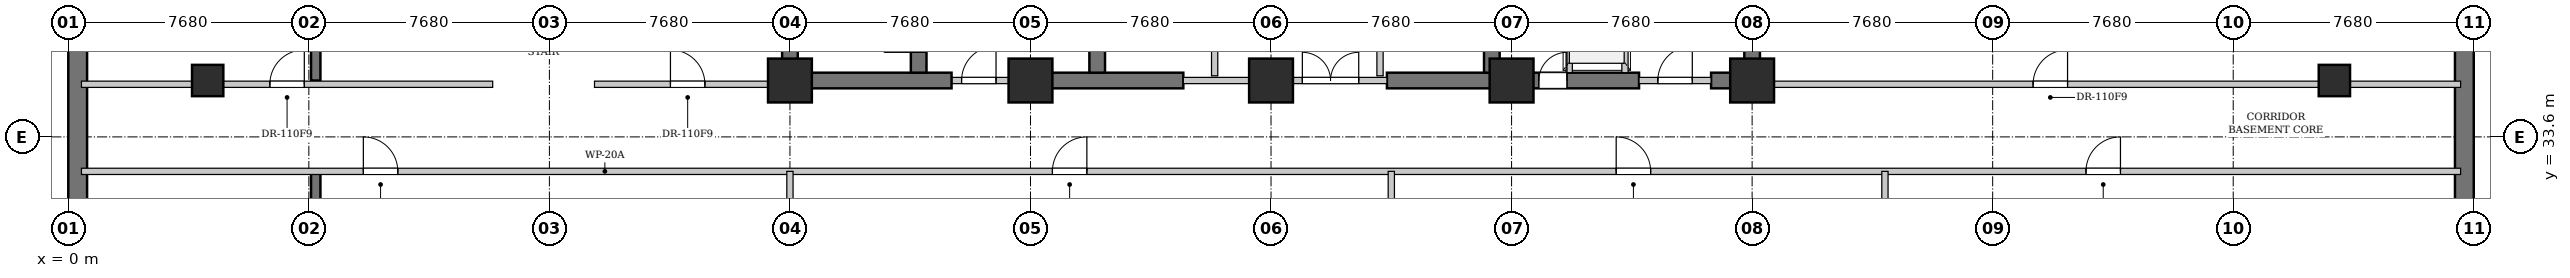
"""IFC4 building model, lengths in metres.
Left out: names, types, materials, properties, quantities, classifications, styles, units other than length and angle.
Written with IfcOpenShell. Run it as: python <this file> out.ifc"""

import sys

from ifc_helpers import new_model, si_unit, direction, frame, frame_2d, origin, origin_2d, place, context, subcontext, project, spatial, rectangle, extrude, element, fill, save


model = new_model("IFC4")
c1 = context("Model", 3, precision=1e-05, world=origin(), true_north=direction((0.0, 1.0)))
c2 = subcontext(c1, "Body", "Model", "MODEL_VIEW")
j1 = project(units=[si_unit("LENGTHUNIT", "METRE"), si_unit("PLANEANGLEUNIT", "RADIAN")], contexts=[c1])
p1 = place(None, origin())
s1 = spatial("IfcSite", under=j1, at=p1, CompositionType="ELEMENT")
p2 = place(p1, origin())
s2 = spatial("IfcBuilding", under=s1, at=p2, CompositionType="ELEMENT")
p3 = place(p2, frame((0.0, 0.0, -10.0)))
s3 = spatial("IfcBuildingStorey", under=s2, at=p3, CompositionType="ELEMENT", Elevation=-10.0)
for number, where, z_axis, x_axis in (
    (1, (0.3, 0.6, 0.0), (0.0, 0.0, 1.0), (0.0, 1.0, 0.0)),
    (2, (76.5, 0.6, 0.0), (0.0, 0.0, 1.0), (0.0, 1.0, 0.0)),
):
    element("IfcWall", number, at=place(p3, frame(where, z_axis=z_axis, x_axis=x_axis)), inside=s3, PredefinedType="USERDEFINED", context=c2, shape_type="SweptSolid", body=[
        extrude(rectangle(XDim=49.2, YDim=0.6, at=frame_2d((24.6, 0.0))), origin(), (0.0, 0.0, 1.0), 4.65),
    ])
p4 = place(p3, frame((22.79, 35.4, 0.0), z_axis=(0.0, 0.0, 1.0), x_axis=(1.0, 0.0, 0.0)))
e3 = element("IfcWall", 3, at=p4, inside=s3, PredefinedType="SHEAR", context=c2, shape_type="SweptSolid", body=[
    extrude(rectangle(XDim=5.41, YDim=0.5, at=frame_2d((2.705, 0.0))), origin(), (0.0, 0.0, 1.0), 4.65),
])
p5 = place(p3, frame((30.72, 35.4, 0.0), z_axis=(0.0, 0.0, 1.0), x_axis=(1.0, 0.0, 0.0)))
e4 = element("IfcWall", 4, at=p5, inside=s3, PredefinedType="SHEAR", context=c2, shape_type="SweptSolid", body=[
    extrude(rectangle(XDim=4.88, YDim=0.5, at=frame_2d((2.44, 0.0))), origin(), (0.0, 0.0, 1.0), 4.65),
])
p6 = place(p3, frame((42.1, 35.4, 0.0), z_axis=(0.0, 0.0, 1.0), x_axis=(1.0, 0.0, 0.0)))
e5 = element("IfcWall", 5, at=p6, inside=s3, PredefinedType="SHEAR", context=c2, shape_type="SweptSolid", body=[
    extrude(rectangle(XDim=8.05, YDim=0.5, at=frame_2d((4.025, 0.0))), origin(), (0.0, 0.0, 1.0), 4.65),
])
p7 = place(p6, frame((4.85, 0.0, 0.0)))
e6 = element("IfcOpeningElement", 6, at=p7, cuts=e5, PredefinedType="OPENING", context=c2, shape_type="SweptSolid", body=[
    extrude(rectangle(XDim=0.9, YDim=2.15, at=frame_2d((0.45, 1.075))), frame((0.0, 0.26, 0.0), z_axis=(0.0, -1.0, 0.0), x_axis=(1.0, 0.0, 0.0)), (0.0, 0.0, 1.0), 0.52),
])
p8 = place(p3, frame((52.45, 35.4, 0.0), z_axis=(0.0, 0.0, 1.0), x_axis=(1.0, 0.0, 0.0)))
e7 = element("IfcWall", 7, at=p8, inside=s3, PredefinedType="SHEAR", context=c2, shape_type="SweptSolid", body=[
    extrude(rectangle(XDim=1.56, YDim=0.5, at=frame_2d((0.78, 0.0))), origin(), (0.0, 0.0, 1.0), 4.65),
])
p9 = place(p3, frame((23.04, 35.65, 0.0), z_axis=(0.0, 0.0, 1.0), x_axis=(0.0, 1.0, 0.0)))
e8 = element("IfcWall", 8, at=p9, inside=s3, PredefinedType="SHEAR", context=c2, shape_type="SweptSolid", body=[
    extrude(rectangle(XDim=10.3, YDim=0.5, at=frame_2d((5.15, 0.0))), origin(), (0.0, 0.0, 1.0), 4.65),
])
p10 = place(p3, frame((27.15, 35.65, 0.0), z_axis=(0.0, 0.0, 1.0), x_axis=(0.0, 1.0, 0.0)))
e9 = element("IfcWall", 9, at=p10, inside=s3, PredefinedType="SHEAR", context=c2, shape_type="SweptSolid", body=[
    extrude(rectangle(XDim=10.3, YDim=0.5, at=frame_2d((5.15, 0.0))), origin(), (0.0, 0.0, 1.0), 4.65),
])
p11 = place(p10, frame((0.65, 0.0, 0.0)))
e10 = element("IfcOpeningElement", 10, at=p11, cuts=e9, PredefinedType="OPENING", context=c2, shape_type="SweptSolid", body=[
    extrude(rectangle(XDim=1.1, YDim=2.15, at=frame_2d((0.55, 1.075))), frame((0.0, 0.26, 0.0), z_axis=(0.0, -1.0, 0.0), x_axis=(1.0, 0.0, 0.0)), (0.0, 0.0, 1.0), 0.52),
])
for number, where, z_axis, x_axis in (
    (11, (32.85, 35.65, 0.0), (0.0, 0.0, 1.0), (0.0, 1.0, 0.0)),
    (12, (45.45, 35.65, 0.0), (0.0, 0.0, 1.0), (0.0, 1.0, 0.0)),
    (13, (53.76, 35.65, 0.0), (0.0, 0.0, 1.0), (0.0, 1.0, 0.0)),
):
    element("IfcWall", number, at=place(p3, frame(where, z_axis=z_axis, x_axis=x_axis)), inside=s3, PredefinedType="SHEAR", context=c2, shape_type="SweptSolid", body=[
        extrude(rectangle(XDim=10.3, YDim=0.5, at=frame_2d((5.15, 0.0))), origin(), (0.0, 0.0, 1.0), 4.65),
    ])
p12 = place(p3, frame((7.9, 0.65, 0.0), z_axis=(0.0, 0.0, 1.0), x_axis=(0.0, 1.0, 0.0)))
e14 = element("IfcWall", 14, at=p12, inside=s3, PredefinedType="SHEAR", context=c2, shape_type="SweptSolid", body=[
    extrude(rectangle(XDim=31.85, YDim=0.3, at=frame_2d((15.925, 0.0))), origin(), (0.0, 0.0, 1.0), 4.65),
])
p13 = place(p3, frame((7.9, 35.4, 0.0), z_axis=(0.0, 0.0, 1.0), x_axis=(0.0, 1.0, 0.0)))
e15 = element("IfcWall", 15, at=p13, inside=s3, PredefinedType="SHEAR", context=c2, shape_type="SweptSolid", body=[
    extrude(rectangle(XDim=14.35, YDim=0.3, at=frame_2d((7.175, 0.0))), origin(), (0.0, 0.0, 1.0), 4.65),
])
for number, where, z_axis, x_axis in (
    (16, (23.04, 35.4, 0.0), (0.0, 0.0, 1.0), (1.0, 0.0, 0.0)),
    (17, (30.72, 35.4, 0.0), (0.0, 0.0, 1.0), (1.0, 0.0, 0.0)),
    (18, (38.4, 35.4, 0.0), (0.0, 0.0, 1.0), (1.0, 0.0, 0.0)),
    (19, (46.08, 35.4, 0.0), (0.0, 0.0, 1.0), (1.0, 0.0, 0.0)),
    (20, (53.76, 35.4, 0.0), (0.0, 0.0, 1.0), (1.0, 0.0, 0.0)),
):
    element("IfcColumn", number, at=place(p3, frame(where, z_axis=z_axis, x_axis=x_axis)), inside=s3, PredefinedType="COLUMN", context=c2, shape_type="SweptSolid", body=[
        extrude(rectangle(XDim=1.4, YDim=1.4, at=origin_2d()), origin(), (0.0, 0.0, 1.0), 5.0),
    ])
for number, where, z_axis, x_axis in (
    (21, (4.45, 35.4, 0.0), (0.0, 0.0, 1.0), (1.0, 0.0, 0.0)),
    (22, (72.35, 35.4, 0.0), (0.0, 0.0, 1.0), (1.0, 0.0, 0.0)),
):
    element("IfcColumn", number, at=place(p3, frame(where, z_axis=z_axis, x_axis=x_axis)), inside=s3, PredefinedType="COLUMN", context=c2, shape_type="SweptSolid", body=[
        extrude(rectangle(XDim=1.0, YDim=1.0, at=origin_2d()), origin(), (0.0, 0.0, 1.0), 5.0),
    ])
p14 = place(p3, frame((28.22, 35.4, 0.0), z_axis=(0.0, 0.0, 1.0), x_axis=(1.0, 0.0, 0.0)))
e23 = element("IfcWall", 23, at=p14, inside=s3, PredefinedType="PARTITIONING", context=c2, shape_type="SweptSolid", body=[
    extrude(rectangle(XDim=2.5, YDim=0.2, at=frame_2d((1.25, 0.0))), origin(), (0.0, 0.0, 1.0), 3.845),
])
p15 = place(p14, frame((0.3, 0.0, 0.0)))
e24 = element("IfcOpeningElement", 24, at=p15, cuts=e23, PredefinedType="OPENING", context=c2, shape_type="SweptSolid", body=[
    extrude(rectangle(XDim=1.1, YDim=2.15, at=frame_2d((0.55, 1.075))), frame((0.0, 0.11, 0.0), z_axis=(0.0, -1.0, 0.0), x_axis=(1.0, 0.0, 0.0)), (0.0, 0.0, 1.0), 0.22),
])
p16 = place(p3, frame((35.6, 35.4, 0.0), z_axis=(0.0, 0.0, 1.0), x_axis=(1.0, 0.0, 0.0)))
e25 = element("IfcWall", 25, at=p16, inside=s3, PredefinedType="PARTITIONING", context=c2, shape_type="SweptSolid", body=[
    extrude(rectangle(XDim=6.5, YDim=0.2, at=frame_2d((3.25, 0.0))), origin(), (0.0, 0.0, 1.0), 3.845),
])
p17 = place(p16, frame((3.8, 0.0, 0.0)))
e26 = element("IfcOpeningElement", 26, at=p17, cuts=e25, PredefinedType="OPENING", context=c2, shape_type="SweptSolid", body=[
    extrude(rectangle(XDim=1.8, YDim=2.3, at=frame_2d((0.9, 1.15))), frame((0.0, 0.11, 0.0), z_axis=(0.0, -1.0, 0.0), x_axis=(1.0, 0.0, 0.0)), (0.0, 0.0, 1.0), 0.22),
])
p18 = place(p3, frame((36.6, 35.55, 0.0), z_axis=(0.0, 0.0, 1.0), x_axis=(0.0, 1.0, 0.0)))
e27 = element("IfcWall", 27, at=p18, inside=s3, PredefinedType="PARTITIONING", context=c2, shape_type="SweptSolid", body=[
    extrude(rectangle(XDim=10.37, YDim=0.2, at=frame_2d((5.185, 0.0))), origin(), (0.0, 0.0, 1.0), 4.65),
])
p19 = place(p3, frame((41.88, 35.55, 0.0), z_axis=(0.0, 0.0, 1.0), x_axis=(0.0, 1.0, 0.0)))
e28 = element("IfcWall", 28, at=p19, inside=s3, PredefinedType="PARTITIONING", context=c2, shape_type="SweptSolid", body=[
    extrude(rectangle(XDim=7.1, YDim=0.2, at=frame_2d((3.55, 0.0))), origin(), (0.0, 0.0, 1.0), 4.65),
])
p20 = place(p19, frame((2.8, 0.0, 0.0)))
e29 = element("IfcOpeningElement", 29, at=p20, cuts=e28, PredefinedType="OPENING", context=c2, shape_type="SweptSolid", body=[
    extrude(rectangle(XDim=0.9, YDim=2.15, at=frame_2d((0.45, 1.075))), frame((0.0, 0.11, 0.0), z_axis=(0.0, -1.0, 0.0), x_axis=(1.0, 0.0, 0.0)), (0.0, 0.0, 1.0), 0.22),
])
p21 = place(p3, frame((50.15, 35.4, 0.0), z_axis=(0.0, 0.0, 1.0), x_axis=(1.0, 0.0, 0.0)))
e30 = element("IfcWall", 30, at=p21, inside=s3, PredefinedType="PARTITIONING", context=c2, shape_type="SweptSolid", body=[
    extrude(rectangle(XDim=2.3, YDim=0.2, at=frame_2d((1.15, 0.0))), origin(), (0.0, 0.0, 1.0), 3.845),
])
p22 = place(p21, frame((0.6, 0.0, 0.0)))
e31 = element("IfcOpeningElement", 31, at=p22, cuts=e30, PredefinedType="OPENING", context=c2, shape_type="SweptSolid", body=[
    extrude(rectangle(XDim=1.1, YDim=2.15, at=frame_2d((0.55, 1.075))), frame((0.0, 0.11, 0.0), z_axis=(0.0, -1.0, 0.0), x_axis=(1.0, 0.0, 0.0)), (0.0, 0.0, 1.0), 0.22),
])
p23 = place(p3, frame((49.7, 35.65, 0.0), z_axis=(0.0, 0.0, 1.0), x_axis=(0.0, 1.0, 0.0)))
e32 = element("IfcWall", 32, at=p23, inside=s3, PredefinedType="PARTITIONING", context=c2, shape_type="SweptSolid", body=[
    extrude(rectangle(XDim=3.15, YDim=0.2, at=frame_2d((1.575, 0.0))), origin(), (0.0, 0.0, 1.0), 4.65),
])
p24 = place(p23, frame((0.85, 0.0, 0.0)))
e33 = element("IfcOpeningElement", 33, at=p24, cuts=e32, PredefinedType="OPENING", context=c2, shape_type="SweptSolid", body=[
    extrude(rectangle(XDim=1.2, YDim=2.2, at=frame_2d((0.6, 1.1))), frame((0.0, 0.11, 0.0), z_axis=(0.0, -1.0, 0.0), x_axis=(1.0, 0.0, 0.0)), (0.0, 0.0, 1.0), 0.22),
])
p25 = place(p3, frame((47.92, 35.65, 0.0), z_axis=(0.0, 0.0, 1.0), x_axis=(0.0, 1.0, 0.0)))
e34 = element("IfcWall", 34, at=p25, inside=s3, PredefinedType="PARTITIONING", context=c2, shape_type="SweptSolid", body=[
    extrude(rectangle(XDim=3.15, YDim=0.2, at=frame_2d((1.575, 0.0))), origin(), (0.0, 0.0, 1.0), 4.65),
])
p26 = place(p3, frame((0.42, 35.28, 0.0), z_axis=(0.0, 0.0, 1.0), x_axis=(1.0, 0.0, 0.0)))
e35 = element("IfcWall", 35, at=p26, inside=s3, PredefinedType="PARTITIONING", context=c2, shape_type="SweptSolid", body=[
    extrude(rectangle(XDim=13.13, YDim=0.2, at=frame_2d((6.565, 0.0))), origin(), (0.0, 0.0, 1.0), 4.65),
])
p27 = place(p26, frame((6.015, 0.0, 0.0)))
e36 = element("IfcOpeningElement", 36, at=p27, cuts=e35, PredefinedType="OPENING", context=c2, shape_type="SweptSolid", body=[
    extrude(rectangle(XDim=1.1, YDim=2.15, at=frame_2d((0.55, 1.075))), frame((0.0, 0.11, 0.0), z_axis=(0.0, -1.0, 0.0), x_axis=(1.0, 0.0, 0.0)), (0.0, 0.0, 1.0), 0.22),
])
p28 = place(p3, frame((16.8, 35.28, 0.0), z_axis=(0.0, 0.0, 1.0), x_axis=(1.0, 0.0, 0.0)))
e37 = element("IfcWall", 37, at=p28, inside=s3, PredefinedType="PARTITIONING", context=c2, shape_type="SweptSolid", body=[
    extrude(rectangle(XDim=5.95, YDim=0.2, at=frame_2d((2.975, 0.0))), origin(), (0.0, 0.0, 1.0), 3.845),
])
p29 = place(p28, frame((2.425, 0.0, 0.0)))
e38 = element("IfcOpeningElement", 38, at=p29, cuts=e37, PredefinedType="OPENING", context=c2, shape_type="SweptSolid", body=[
    extrude(rectangle(XDim=1.1, YDim=2.15, at=frame_2d((0.55, 1.075))), frame((0.0, 0.11, 0.0), z_axis=(0.0, -1.0, 0.0), x_axis=(1.0, 0.0, 0.0)), (0.0, 0.0, 1.0), 0.22),
])
p30 = place(p3, frame((54.05, 35.28, 0.0), z_axis=(0.0, 0.0, 1.0), x_axis=(1.0, 0.0, 0.0)))
e39 = element("IfcWall", 39, at=p30, inside=s3, PredefinedType="PARTITIONING", context=c2, shape_type="SweptSolid", body=[
    extrude(rectangle(XDim=22.33, YDim=0.2, at=frame_2d((11.165, 0.0))), origin(), (0.0, 0.0, 1.0), 3.845),
])
p31 = place(p30, frame((8.681, 0.0, 0.0)))
e40 = element("IfcOpeningElement", 40, at=p31, cuts=e39, PredefinedType="OPENING", context=c2, shape_type="SweptSolid", body=[
    extrude(rectangle(XDim=1.1, YDim=2.15, at=frame_2d((0.55, 1.075))), frame((0.0, 0.11, 0.0), z_axis=(0.0, -1.0, 0.0), x_axis=(1.0, 0.0, 0.0)), (0.0, 0.0, 1.0), 0.22),
])
p32 = place(p3, frame((0.42, 32.5, 0.0), z_axis=(0.0, 0.0, 1.0), x_axis=(1.0, 0.0, 0.0)))
e41 = element("IfcWall", 41, at=p32, inside=s3, PredefinedType="PARTITIONING", context=c2, shape_type="SweptSolid", body=[
    extrude(rectangle(XDim=75.96, YDim=0.2, at=frame_2d((37.98, 0.0))), origin(), (0.0, 0.0, 1.0), 3.845),
])
p33 = place(p32, frame((9.0, 0.0, 0.0)))
e42 = element("IfcOpeningElement", 42, at=p33, cuts=e41, PredefinedType="OPENING", context=c2, shape_type="SweptSolid", body=[
    extrude(rectangle(XDim=1.1, YDim=2.15, at=frame_2d((0.55, 1.075))), frame((0.0, 0.11, 0.0), z_axis=(0.0, -1.0, 0.0), x_axis=(1.0, 0.0, 0.0)), (0.0, 0.0, 1.0), 0.22),
])
p34 = place(p32, frame((31.0, 0.0, 0.0)))
e43 = element("IfcOpeningElement", 43, at=p34, cuts=e41, PredefinedType="OPENING", context=c2, shape_type="SweptSolid", body=[
    extrude(rectangle(XDim=1.1, YDim=2.15, at=frame_2d((0.55, 1.075))), frame((0.0, 0.11, 0.0), z_axis=(0.0, -1.0, 0.0), x_axis=(1.0, 0.0, 0.0)), (0.0, 0.0, 1.0), 0.22),
])
p35 = place(p32, frame((49.0, 0.0, 0.0)))
e44 = element("IfcOpeningElement", 44, at=p35, cuts=e41, PredefinedType="OPENING", context=c2, shape_type="SweptSolid", body=[
    extrude(rectangle(XDim=1.1, YDim=2.15, at=frame_2d((0.55, 1.075))), frame((0.0, 0.11, 0.0), z_axis=(0.0, -1.0, 0.0), x_axis=(1.0, 0.0, 0.0)), (0.0, 0.0, 1.0), 0.22),
])
p36 = place(p32, frame((64.0, 0.0, 0.0)))
e45 = element("IfcOpeningElement", 45, at=p36, cuts=e41, PredefinedType="OPENING", context=c2, shape_type="SweptSolid", body=[
    extrude(rectangle(XDim=1.1, YDim=2.15, at=frame_2d((0.55, 1.075))), frame((0.0, 0.11, 0.0), z_axis=(0.0, -1.0, 0.0), x_axis=(1.0, 0.0, 0.0)), (0.0, 0.0, 1.0), 0.22),
])
p37 = place(p3, frame((23.04, 0.42, 0.0), z_axis=(0.0, 0.0, 1.0), x_axis=(0.0, 1.0, 0.0)))
e46 = element("IfcWall", 46, at=p37, inside=s3, PredefinedType="PARTITIONING", context=c2, shape_type="SweptSolid", body=[
    extrude(rectangle(XDim=32.08, YDim=0.2, at=frame_2d((16.04, 0.0))), origin(), (0.0, 0.0, 1.0), 3.845),
])
p38 = place(p3, frame((42.24, 0.42, 0.0), z_axis=(0.0, 0.0, 1.0), x_axis=(0.0, 1.0, 0.0)))
e47 = element("IfcWall", 47, at=p38, inside=s3, PredefinedType="PARTITIONING", context=c2, shape_type="SweptSolid", body=[
    extrude(rectangle(XDim=32.08, YDim=0.2, at=frame_2d((16.04, 0.0))), origin(), (0.0, 0.0, 1.0), 4.65),
])
p39 = place(p3, frame((58.0, 0.42, 0.0), z_axis=(0.0, 0.0, 1.0), x_axis=(0.0, 1.0, 0.0)))
e48 = element("IfcWall", 48, at=p39, inside=s3, PredefinedType="PARTITIONING", context=c2, shape_type="SweptSolid", body=[
    extrude(rectangle(XDim=32.08, YDim=0.2, at=frame_2d((16.04, 0.0))), origin(), (0.0, 0.0, 1.0), 3.845),
])
p40 = place(p15, origin())
e49 = element("IfcDoor", 49, at=p40, inside=s3, OperationType="SINGLE_SWING_RIGHT", PredefinedType="DOOR", context=c2, shape_type="SweptSolid", body=[
    extrude(rectangle(XDim=1.1, YDim=2.15, at=frame_2d((0.55, 1.075))), frame((0.0, 0.025, 0.0), z_axis=(0.0, -1.0, 0.0), x_axis=(1.0, 0.0, 0.0)), (0.0, 0.0, 1.0), 0.05),
])
fill(e24, e49)
p41 = place(p17, origin())
e50 = element("IfcDoor", 50, at=p41, inside=s3, OperationType="DOUBLE_DOOR_SINGLE_SWING", PredefinedType="DOOR", context=c2, shape_type="SweptSolid", body=[
    extrude(rectangle(XDim=1.8, YDim=2.3, at=frame_2d((0.9, 1.15))), frame((0.0, 0.025, 0.0), z_axis=(0.0, -1.0, 0.0), x_axis=(1.0, 0.0, 0.0)), (0.0, 0.0, 1.0), 0.05),
])
fill(e26, e50)
p42 = place(p22, origin())
e51 = element("IfcDoor", 51, at=p42, inside=s3, OperationType="SINGLE_SWING_RIGHT", PredefinedType="DOOR", context=c2, shape_type="SweptSolid", body=[
    extrude(rectangle(XDim=1.1, YDim=2.15, at=frame_2d((0.55, 1.075))), frame((0.0, 0.025, 0.0), z_axis=(0.0, -1.0, 0.0), x_axis=(1.0, 0.0, 0.0)), (0.0, 0.0, 1.0), 0.05),
])
fill(e31, e51)
p43 = place(p27, origin())
e52 = element("IfcDoor", 52, at=p43, inside=s3, OperationType="SINGLE_SWING_RIGHT", PredefinedType="DOOR", context=c2, shape_type="SweptSolid", body=[
    extrude(rectangle(XDim=1.1, YDim=2.15, at=frame_2d((0.55, 1.075))), frame((0.0, 0.025, 0.0), z_axis=(0.0, -1.0, 0.0), x_axis=(1.0, 0.0, 0.0)), (0.0, 0.0, 1.0), 0.05),
])
fill(e36, e52)
p44 = place(p29, origin())
e53 = element("IfcDoor", 53, at=p44, inside=s3, OperationType="SINGLE_SWING_LEFT", PredefinedType="DOOR", context=c2, shape_type="SweptSolid", body=[
    extrude(rectangle(XDim=1.1, YDim=2.15, at=frame_2d((0.55, 1.075))), frame((0.0, 0.025, 0.0), z_axis=(0.0, -1.0, 0.0), x_axis=(1.0, 0.0, 0.0)), (0.0, 0.0, 1.0), 0.05),
])
fill(e38, e53)
p45 = place(p31, origin())
e54 = element("IfcDoor", 54, at=p45, inside=s3, OperationType="SINGLE_SWING_RIGHT", PredefinedType="DOOR", context=c2, shape_type="SweptSolid", body=[
    extrude(rectangle(XDim=1.1, YDim=2.15, at=frame_2d((0.55, 1.075))), frame((0.0, 0.025, 0.0), z_axis=(0.0, -1.0, 0.0), x_axis=(1.0, 0.0, 0.0)), (0.0, 0.0, 1.0), 0.05),
])
fill(e40, e54)
p46 = place(p33, origin())
e55 = element("IfcDoor", 55, at=p46, inside=s3, OperationType="SINGLE_SWING_LEFT", PredefinedType="DOOR", context=c2, shape_type="SweptSolid", body=[
    extrude(rectangle(XDim=1.1, YDim=2.15, at=frame_2d((0.55, 1.075))), frame((0.0, 0.025, 0.0), z_axis=(0.0, -1.0, 0.0), x_axis=(1.0, 0.0, 0.0)), (0.0, 0.0, 1.0), 0.05),
])
fill(e42, e55)
p47 = place(p34, origin())
e56 = element("IfcDoor", 56, at=p47, inside=s3, OperationType="SINGLE_SWING_RIGHT", PredefinedType="DOOR", context=c2, shape_type="SweptSolid", body=[
    extrude(rectangle(XDim=1.1, YDim=2.15, at=frame_2d((0.55, 1.075))), frame((0.0, 0.025, 0.0), z_axis=(0.0, -1.0, 0.0), x_axis=(1.0, 0.0, 0.0)), (0.0, 0.0, 1.0), 0.05),
])
fill(e43, e56)
p48 = place(p35, origin())
e57 = element("IfcDoor", 57, at=p48, inside=s3, OperationType="SINGLE_SWING_LEFT", PredefinedType="DOOR", context=c2, shape_type="SweptSolid", body=[
    extrude(rectangle(XDim=1.1, YDim=2.15, at=frame_2d((0.55, 1.075))), frame((0.0, 0.025, 0.0), z_axis=(0.0, -1.0, 0.0), x_axis=(1.0, 0.0, 0.0)), (0.0, 0.0, 1.0), 0.05),
])
fill(e44, e57)
p49 = place(p36, origin())
e58 = element("IfcDoor", 58, at=p49, inside=s3, OperationType="SINGLE_SWING_RIGHT", PredefinedType="DOOR", context=c2, shape_type="SweptSolid", body=[
    extrude(rectangle(XDim=1.1, YDim=2.15, at=frame_2d((0.55, 1.075))), frame((0.0, 0.025, 0.0), z_axis=(0.0, -1.0, 0.0), x_axis=(1.0, 0.0, 0.0)), (0.0, 0.0, 1.0), 0.05),
])
fill(e45, e58)
p50 = place(p11, origin())
e59 = element("IfcDoor", 59, at=p50, inside=s3, OperationType="SINGLE_SWING_LEFT", PredefinedType="DOOR", context=c2, shape_type="SweptSolid", body=[
    extrude(rectangle(XDim=1.1, YDim=2.15, at=frame_2d((0.55, 1.075))), frame((0.0, 0.025, 0.0), z_axis=(0.0, -1.0, 0.0), x_axis=(1.0, 0.0, 0.0)), (0.0, 0.0, 1.0), 0.05),
])
fill(e10, e59)
p51 = place(p7, origin())
e60 = element("IfcDoor", 60, at=p51, inside=s3, OperationType="SINGLE_SWING_RIGHT", PredefinedType="DOOR", context=c2, shape_type="SweptSolid", body=[
    extrude(rectangle(XDim=0.9, YDim=2.15, at=frame_2d((0.45, 1.075))), frame((0.0, 0.025, 0.0), z_axis=(0.0, -1.0, 0.0), x_axis=(1.0, 0.0, 0.0)), (0.0, 0.0, 1.0), 0.05),
])
fill(e6, e60)
save(model, sys.argv[1])
